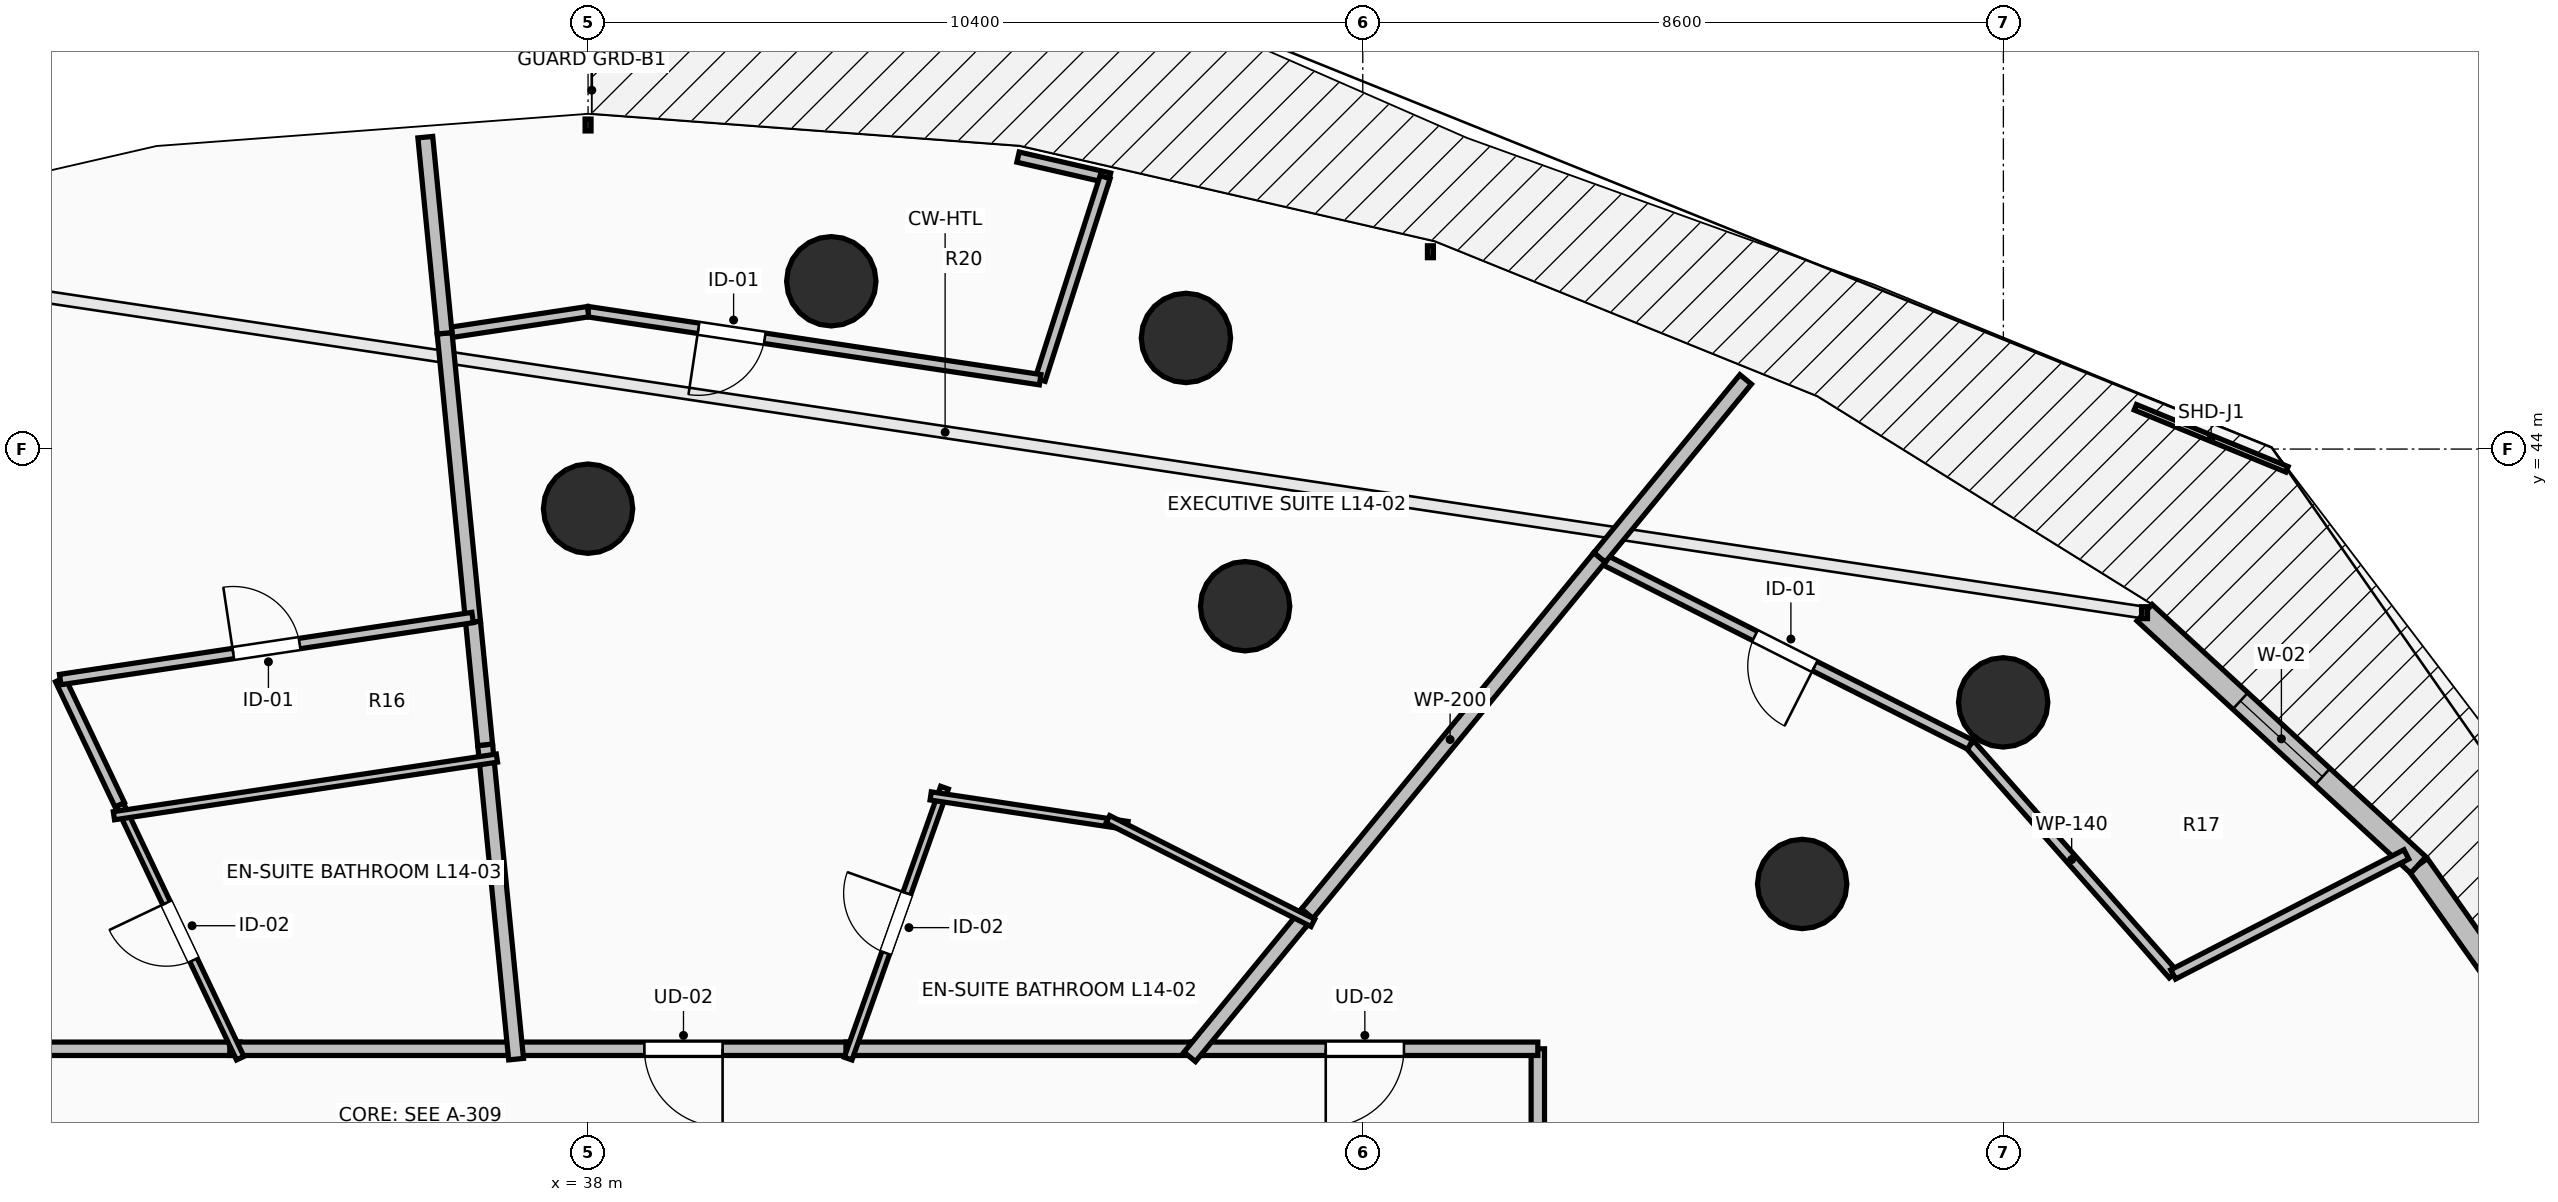
"""IFC4 building model, lengths in metres.
Left out: names, types, materials, properties, quantities, classifications, styles, units other than length and angle.
Written with IfcOpenShell. Run it as: python <this file> out.ifc"""

import sys

from ifc_helpers import new_model, si_unit, direction, frame, frame_2d, origin, origin_2d, place, context, subcontext, project, spatial, rectangle, circle, extrude, element, fill, save


model = new_model("IFC4")
c1 = context("Model", 3, precision=1e-05, world=origin(), true_north=direction((0.0, 1.0)))
c2 = subcontext(c1, "Body", "Model", "MODEL_VIEW")
j1 = project(units=[si_unit("LENGTHUNIT", "METRE"), si_unit("PLANEANGLEUNIT", "RADIAN")], contexts=[c1])
p1 = place(None, origin())
s1 = spatial("IfcSite", under=j1, at=p1, CompositionType="ELEMENT")
p2 = place(p1, origin())
s2 = spatial("IfcBuilding", under=s1, at=p2, CompositionType="ELEMENT")
p3 = place(p2, frame((0.0, 0.0, 55.5)))
s3 = spatial("IfcBuildingStorey", under=s2, at=p3, CompositionType="ELEMENT", Elevation=55.5)
for number, where, z_axis, x_axis in (
    (1, (54.299, 38.162, 0.0), (0.0, 0.0, 1.0), (0.707, 0.707, 0.0)),
    (2, (46.821, 41.891, 0.0), (0.0, 0.0, 1.0), (0.383, 0.924, 0.0)),
    (3, (38.0, 43.2, 0.0), (0.0, 0.0, 1.0), (0.0, 1.0, 0.0)),
    (4, (56.997, 40.6, 0.0), (0.0, 0.0, 1.0), (0.707, 0.707, 0.0)),
    (5, (46.026, 45.492, 0.0), (0.0, 0.0, 1.0), (0.383, 0.924, 0.0)),
    (6, (41.265, 46.252, 0.0), (0.0, 0.0, 1.0), (0.0, 1.0, 0.0)),
):
    element("IfcColumn", number, at=place(p3, frame(where, z_axis=z_axis, x_axis=x_axis)), inside=s3, PredefinedType="COLUMN", context=c2, shape_type="SweptSolid", body=[
        extrude(circle(Radius=0.6, at=origin_2d()), origin(), (0.0, 0.0, 1.0), 3.5),
    ])
p4 = place(p3, frame((65.301, 34.553, 0.0), z_axis=(0.0, 0.0, 1.0), x_axis=(-0.577130815624, 0.816651713803, 0.0)))
e7 = element("IfcWall", 7, at=p4, inside=s3, PredefinedType="STANDARD", context=c2, shape_type="SweptSolid", body=[
    extrude(rectangle(XDim=4.731, YDim=0.3, at=frame_2d((2.366, 0.0))), origin(), (0.0, 0.0, 1.0), 3.24),
])
p5 = place(p4, frame((1.566, 0.0, 0.0)))
e8 = element("IfcOpeningElement", 8, at=p5, cuts=e7, PredefinedType="OPENING", context=c2, shape_type="SweptSolid", body=[
    extrude(rectangle(XDim=1.6, YDim=2.3, at=frame_2d((0.8, 1.15))), frame((0.0, 0.165, 0.0), z_axis=(0.0, -1.0, 0.0), x_axis=(1.0, 0.0, 0.0)), (0.0, 0.0, 1.0), 0.33),
])
p6 = place(p3, frame((62.57, 38.417, 0.0), z_axis=(0.0, 0.0, 1.0), x_axis=(-0.735342629635, 0.677695519419, 0.0)))
e9 = element("IfcWall", 9, at=p6, inside=s3, PredefinedType="STANDARD", context=c2, shape_type="SweptSolid", body=[
    extrude(rectangle(XDim=4.997, YDim=0.3, at=frame_2d((2.499, 0.0))), origin(), (0.0, 0.0, 1.0), 3.24),
])
p7 = place(p6, frame((1.749, 0.0, 0.85)))
e10 = element("IfcOpeningElement", 10, at=p7, cuts=e9, PredefinedType="OPENING", context=c2, shape_type="SweptSolid", body=[
    extrude(rectangle(XDim=1.5, YDim=2.19, at=frame_2d((0.75, 1.095))), frame((0.0, 0.165, 0.0), z_axis=(0.0, -1.0, 0.0), x_axis=(1.0, 0.0, 0.0)), (0.0, 0.0, 1.0), 0.33),
])
p8 = place(p3, frame((50.75, 32.001, 0.0), z_axis=(0.0, 0.0, 1.0), x_axis=(0.0, 1.0, 0.0)))
e11 = element("IfcWall", 11, at=p8, inside=s3, PredefinedType="PARTITIONING", context=c2, shape_type="SweptSolid", body=[
    extrude(rectangle(XDim=3.949, YDim=0.18, at=frame_2d((1.975, 0.0))), origin(), (0.0, 0.0, 1.0), 2.432),
])
p9 = place(p3, frame((50.75, 35.95, 0.0), z_axis=(0.0, 0.0, 1.0), x_axis=(-1.0, 0.0, 0.0)))
e12 = element("IfcWall", 12, at=p9, inside=s3, PredefinedType="PARTITIONING", context=c2, shape_type="SweptSolid", body=[
    extrude(rectangle(XDim=4.644, YDim=0.18, at=frame_2d((2.322, 0.0))), origin(), (0.0, 0.0, 1.0), 2.432),
])
p10 = place(p9, frame((1.797, 0.0, 0.0)))
e13 = element("IfcOpeningElement", 13, at=p10, cuts=e12, PredefinedType="OPENING", context=c2, shape_type="SweptSolid", body=[
    extrude(rectangle(XDim=1.05, YDim=2.2, at=frame_2d((0.525, 1.1))), frame((0.0, 0.105, 0.0), z_axis=(0.0, -1.0, 0.0), x_axis=(1.0, 0.0, 0.0)), (0.0, 0.0, 1.0), 0.21),
])
p11 = place(p3, frame((41.602, 35.95, 0.0), z_axis=(0.0, 0.0, 1.0), x_axis=(-1.0, 0.0, 0.0)))
e14 = element("IfcWall", 14, at=p11, inside=s3, PredefinedType="PARTITIONING", context=c2, shape_type="SweptSolid", body=[
    extrude(rectangle(XDim=4.642, YDim=0.18, at=frame_2d((2.321, 0.0))), origin(), (0.0, 0.0, 1.0), 3.24),
])
p12 = place(p11, frame((1.796, 0.0, 0.0)))
e15 = element("IfcOpeningElement", 15, at=p12, cuts=e14, PredefinedType="OPENING", context=c2, shape_type="SweptSolid", body=[
    extrude(rectangle(XDim=1.05, YDim=2.2, at=frame_2d((0.525, 1.1))), frame((0.0, 0.105, 0.0), z_axis=(0.0, -1.0, 0.0), x_axis=(1.0, 0.0, 0.0)), (0.0, 0.0, 1.0), 0.21),
])
p13 = place(p3, frame((46.246, 35.95, 0.0), z_axis=(0.0, 0.0, 1.0), x_axis=(-1.0, 0.0, 0.0)))
e16 = element("IfcWall", 16, at=p13, inside=s3, PredefinedType="PARTITIONING", context=c2, shape_type="SweptSolid", body=[
    extrude(rectangle(XDim=4.784, YDim=0.18, at=frame_2d((2.392, 0.0))), origin(), (0.0, 0.0, 1.0), 3.24),
])
p14 = place(p3, frame((33.33, 35.95, 0.0), z_axis=(0.0, 0.0, 1.0), x_axis=(-1.0, 0.0, 0.0)))
e17 = element("IfcWall", 17, at=p14, inside=s3, PredefinedType="PARTITIONING", context=c2, shape_type="SweptSolid", body=[
    extrude(rectangle(XDim=7.549, YDim=0.18, at=frame_2d((3.774, 0.0))), origin(), (0.0, 0.0, 1.0), 2.432),
])
p15 = place(p14, frame((3.25, 0.0, 0.0)))
e18 = element("IfcOpeningElement", 18, at=p15, cuts=e17, PredefinedType="OPENING", context=c2, shape_type="SweptSolid", body=[
    extrude(rectangle(XDim=1.05, YDim=2.2, at=frame_2d((0.525, 1.1))), frame((0.0, 0.105, 0.0), z_axis=(0.0, -1.0, 0.0), x_axis=(1.0, 0.0, 0.0)), (0.0, 0.0, 1.0), 0.21),
])
p16 = place(p3, frame((37.1, 35.95, 0.0), z_axis=(0.0, 0.0, 1.0), x_axis=(-1.0, 0.0, 0.0)))
e19 = element("IfcWall", 19, at=p16, inside=s3, PredefinedType="PARTITIONING", context=c2, shape_type="SweptSolid", body=[
    extrude(rectangle(XDim=3.91, YDim=0.18, at=frame_2d((1.955, 0.0))), origin(), (0.0, 0.0, 1.0), 3.24),
])
p17 = place(p3, frame((59.279, 36.948, 0.0), z_axis=(0.0, 0.0, 1.0), x_axis=(-0.662159063844, 0.749363312532, 0.0)))
e20 = element("IfcWall", 20, at=p17, inside=s3, PredefinedType="PARTITIONING", context=c2, shape_type="SweptSolid", body=[
    extrude(rectangle(XDim=4.115, YDim=0.14, at=frame_2d((2.058, 0.0))), origin(), (0.0, 0.0, 1.0), 2.432),
])
p18 = place(p3, frame((56.554, 40.032, 0.0), z_axis=(0.0, 0.0, 1.0), x_axis=(-0.892518178955, 0.451011419184, 0.0)))
e21 = element("IfcWall", 21, at=p18, inside=s3, PredefinedType="PARTITIONING", context=c2, shape_type="SweptSolid", body=[
    extrude(rectangle(XDim=5.574, YDim=0.14, at=frame_2d((2.787, 0.0))), origin(), (0.0, 0.0, 1.0), 2.432),
])
p19 = place(p18, frame((2.337, 0.0, 0.0)))
e22 = element("IfcOpeningElement", 22, at=p19, cuts=e21, PredefinedType="OPENING", context=c2, shape_type="SweptSolid", body=[
    extrude(rectangle(XDim=0.9, YDim=2.1, at=frame_2d((0.45, 1.05))), frame((0.0, 0.085, 0.0), z_axis=(0.0, -1.0, 0.0), x_axis=(1.0, 0.0, 0.0)), (0.0, 0.0, 1.0), 0.17),
])
p20 = place(p3, frame((62.41, 38.559, 0.0), z_axis=(0.0, 0.0, 1.0), x_axis=(-0.889180616302, -0.457556369852, 0.0)))
e23 = element("IfcWall", 23, at=p20, inside=s3, PredefinedType="PARTITIONING", context=c2, shape_type="SweptSolid", body=[
    extrude(rectangle(XDim=3.521, YDim=0.14, at=frame_2d((1.76, 0.0))), origin(), (0.0, 0.0, 1.0), 2.624),
])
p21 = place(p3, frame((51.579, 42.546, 0.0), z_axis=(0.0, 0.0, 1.0), x_axis=(-0.634407686013, -0.772998633846, 0.0)))
e24 = element("IfcWall", 24, at=p21, inside=s3, PredefinedType="PARTITIONING", context=c2, shape_type="SweptSolid", body=[
    extrude(rectangle(XDim=6.326, YDim=0.2, at=frame_2d((3.163, 0.0))), origin(), (0.0, 0.0, 1.0), 2.432),
])
p22 = place(p3, frame((47.655, 37.764, 0.0), z_axis=(0.0, 0.0, 1.0), x_axis=(-0.634343688691, -0.773051152653, 0.0)))
e25 = element("IfcWall", 25, at=p22, inside=s3, PredefinedType="PARTITIONING", context=c2, shape_type="SweptSolid", body=[
    extrude(rectangle(XDim=2.487, YDim=0.2, at=frame_2d((1.244, 0.0))), origin(), (0.0, 0.0, 1.0), 2.432),
])
p23 = place(p3, frame((53.54, 44.935, 0.0), z_axis=(0.0, 0.0, 1.0), x_axis=(-0.634432805544, -0.772978017313, 0.0)))
e26 = element("IfcWall", 26, at=p23, inside=s3, PredefinedType="PARTITIONING", context=c2, shape_type="SweptSolid", body=[
    extrude(rectangle(XDim=3.091, YDim=0.2, at=frame_2d((1.545, 0.0))), origin(), (0.0, 0.0, 1.0), 2.624),
])
p24 = place(p3, frame((41.491, 35.818, 0.0), z_axis=(0.0, 0.0, 1.0), x_axis=(0.33515815105, 0.942161883004, 0.0)))
e27 = element("IfcWall", 27, at=p24, inside=s3, PredefinedType="PARTITIONING", context=c2, shape_type="SweptSolid", body=[
    extrude(rectangle(XDim=3.86, YDim=0.11, at=frame_2d((1.93, 0.0))), origin(), (0.0, 0.0, 1.0), 2.929),
])
p25 = place(p24, frame((1.505, 0.0, 0.0)))
e28 = element("IfcOpeningElement", 28, at=p25, cuts=e27, PredefinedType="OPENING", context=c2, shape_type="SweptSolid", body=[
    extrude(rectangle(XDim=0.85, YDim=2.1, at=frame_2d((0.425, 1.05))), frame((0.0, 0.07, 0.0), z_axis=(0.0, -1.0, 0.0), x_axis=(1.0, 0.0, 0.0)), (0.0, 0.0, 1.0), 0.14),
])
p26 = place(p3, frame((42.6, 39.344, 0.0), z_axis=(0.0, 0.0, 1.0), x_axis=(0.988924954203, -0.148416424141, 0.0)))
e29 = element("IfcWall", 29, at=p26, inside=s3, PredefinedType="PARTITIONING", context=c2, shape_type="SweptSolid", body=[
    extrude(rectangle(XDim=2.671, YDim=0.11, at=frame_2d((1.336, 0.0))), origin(), (0.0, 0.0, 1.0), 3.24),
])
p27 = place(p3, frame((44.978, 39.031, 0.0), z_axis=(0.0, 0.0, 1.0), x_axis=(0.892423163915, -0.451199397725, 0.0)))
e30 = element("IfcWall", 30, at=p27, inside=s3, PredefinedType="PARTITIONING", context=c2, shape_type="SweptSolid", body=[
    extrude(rectangle(XDim=3.084, YDim=0.11, at=frame_2d((1.542, 0.0))), origin(), (0.0, 0.0, 1.0), 2.432),
])
p28 = place(p3, frame((45.0, 47.637, 0.0), z_axis=(0.0, 0.0, 1.0), x_axis=(-0.974635544723, 0.223798022695, 0.0)))
e31 = element("IfcWall", 31, at=p28, inside=s3, PredefinedType="PARTITIONING", context=c2, shape_type="SweptSolid", body=[
    extrude(rectangle(XDim=1.26, YDim=0.14, at=frame_2d((0.63, 0.0))), origin(), (0.0, 0.0, 1.0), 3.24),
])
p29 = place(p3, frame((44.941, 47.65, 0.0), z_axis=(0.0, 0.0, 1.0), x_axis=(-0.305331010086, -0.952246278165, 0.0)))
e32 = element("IfcWall", 32, at=p29, inside=s3, PredefinedType="PARTITIONING", context=c2, shape_type="SweptSolid", body=[
    extrude(rectangle(XDim=2.855, YDim=0.14, at=frame_2d((1.428, 0.0))), origin(), (0.0, 0.0, 1.0), 2.624),
])
p30 = place(p3, frame((44.069, 44.931, 0.0), z_axis=(0.0, 0.0, 1.0), x_axis=(-0.988871191019, 0.148774216759, 0.0)))
e33 = element("IfcWall", 33, at=p30, inside=s3, PredefinedType="PARTITIONING", context=c2, shape_type="SweptSolid", body=[
    extrude(rectangle(XDim=6.137, YDim=0.14, at=frame_2d((3.069, 0.0))), origin(), (0.0, 0.0, 1.0), 2.432),
])
p31 = place(p30, frame((3.739, 0.0, 0.0)))
e34 = element("IfcOpeningElement", 34, at=p31, cuts=e33, PredefinedType="OPENING", context=c2, shape_type="SweptSolid", body=[
    extrude(rectangle(XDim=0.9, YDim=2.1, at=frame_2d((0.45, 1.05))), frame((0.0, 0.085, 0.0), z_axis=(0.0, -1.0, 0.0), x_axis=(1.0, 0.0, 0.0)), (0.0, 0.0, 1.0), 0.17),
])
p32 = place(p3, frame((38.0, 45.844, 0.0), z_axis=(0.0, 0.0, 1.0), x_axis=(-0.988850683948, -0.148910459188, 0.0)))
e35 = element("IfcWall", 35, at=p32, inside=s3, PredefinedType="PARTITIONING", context=c2, shape_type="SweptSolid", body=[
    extrude(rectangle(XDim=1.948, YDim=0.14, at=frame_2d((0.974, 0.0))), origin(), (0.0, 0.0, 1.0), 2.624),
])
p33 = place(p3, frame((36.074, 45.554, 0.0), z_axis=(0.0, 0.0, 1.0), x_axis=(0.098125465648, -0.995174051607, 0.0)))
e36 = element("IfcWall", 36, at=p33, inside=s3, PredefinedType="PARTITIONING", context=c2, shape_type="SweptSolid", body=[
    extrude(rectangle(XDim=3.894, YDim=0.2, at=frame_2d((1.947, 0.0))), origin(), (0.0, 0.0, 1.0), 2.432),
])
p34 = place(p3, frame((36.618, 40.03, 0.0), z_axis=(0.0, 0.0, 1.0), x_axis=(0.09794716995, -0.995191615669, 0.0)))
e37 = element("IfcWall", 37, at=p34, inside=s3, PredefinedType="PARTITIONING", context=c2, shape_type="SweptSolid", body=[
    extrude(rectangle(XDim=4.24, YDim=0.2, at=frame_2d((2.12, 0.0))), origin(), (0.0, 0.0, 1.0), 2.929),
])
p35 = place(p3, frame((36.456, 41.679, 0.0), z_axis=(0.0, 0.0, 1.0), x_axis=(0.098146679276, -0.995171959687, 0.0)))
e38 = element("IfcWall", 38, at=p35, inside=s3, PredefinedType="PARTITIONING", context=c2, shape_type="SweptSolid", body=[
    extrude(rectangle(XDim=1.657, YDim=0.2, at=frame_2d((0.828, 0.0))), origin(), (0.0, 0.0, 1.0), 2.432),
])
p36 = place(p3, frame((35.815, 48.187, 0.0), z_axis=(0.0, 0.0, 1.0), x_axis=(0.097904750383, -0.995195789708, 0.0)))
e39 = element("IfcWall", 39, at=p36, inside=s3, PredefinedType="PARTITIONING", context=c2, shape_type="SweptSolid", body=[
    extrude(rectangle(XDim=2.646, YDim=0.2, at=frame_2d((1.323, 0.0))), origin(), (0.0, 0.0, 1.0), 2.624),
])
p37 = place(p3, frame((33.33, 35.823, 0.0), z_axis=(0.0, 0.0, 1.0), x_axis=(-0.429339722165, 0.903143068938, 0.0)))
e40 = element("IfcWall", 40, at=p37, inside=s3, PredefinedType="PARTITIONING", context=c2, shape_type="SweptSolid", body=[
    extrude(rectangle(XDim=3.767, YDim=0.11, at=frame_2d((1.883, 0.0))), origin(), (0.0, 0.0, 1.0), 2.432),
])
p38 = place(p37, frame((1.458, 0.0, 0.0)))
e41 = element("IfcOpeningElement", 41, at=p38, cuts=e40, PredefinedType="OPENING", context=c2, shape_type="SweptSolid", body=[
    extrude(rectangle(XDim=0.85, YDim=2.1, at=frame_2d((0.425, 1.05))), frame((0.0, 0.07, 0.0), z_axis=(0.0, -1.0, 0.0), x_axis=(1.0, 0.0, 0.0)), (0.0, 0.0, 1.0), 0.14),
])
p39 = place(p3, frame((31.713, 39.225, 0.0), z_axis=(0.0, 0.0, 1.0), x_axis=(-0.429281598359, 0.90317069777, 0.0)))
e42 = element("IfcWall", 42, at=p39, inside=s3, PredefinedType="PARTITIONING", context=c2, shape_type="SweptSolid", body=[
    extrude(rectangle(XDim=1.861, YDim=0.14, at=frame_2d((0.93, 0.0))), origin(), (0.0, 0.0, 1.0), 2.886),
])
p40 = place(p3, frame((30.914, 40.906, 0.0), z_axis=(0.0, 0.0, 1.0), x_axis=(0.988867472121, 0.148798933401, 0.0)))
e43 = element("IfcWall", 43, at=p40, inside=s3, PredefinedType="PARTITIONING", context=c2, shape_type="SweptSolid", body=[
    extrude(rectangle(XDim=5.598, YDim=0.14, at=frame_2d((2.799, 0.0))), origin(), (0.0, 0.0, 1.0), 2.432),
])
p41 = place(p40, frame((2.349, 0.0, 0.0)))
e44 = element("IfcOpeningElement", 44, at=p41, cuts=e43, PredefinedType="OPENING", context=c2, shape_type="SweptSolid", body=[
    extrude(rectangle(XDim=0.9, YDim=2.1, at=frame_2d((0.45, 1.05))), frame((0.0, 0.085, 0.0), z_axis=(0.0, -1.0, 0.0), x_axis=(1.0, 0.0, 0.0)), (0.0, 0.0, 1.0), 0.17),
])
p42 = place(p3, frame((36.776, 39.852, 0.0), z_axis=(0.0, 0.0, 1.0), x_axis=(-0.988868403521, -0.148792743496, 0.0)))
e45 = element("IfcWall", 45, at=p42, inside=s3, PredefinedType="PARTITIONING", context=c2, shape_type="SweptSolid", body=[
    extrude(rectangle(XDim=5.2, YDim=0.11, at=frame_2d((2.6, 0.0))), origin(), (0.0, 0.0, 1.0), 2.432),
])
p43 = place(p7, origin())
e46 = element("IfcWindow", 46, at=p43, inside=s3, PartitioningType="SINGLE_PANEL", PredefinedType="WINDOW", context=c2, shape_type="SweptSolid", body=[
    extrude(rectangle(XDim=1.5, YDim=2.19, at=frame_2d((0.75, 1.095))), frame((0.0, 0.03, 0.0), z_axis=(0.0, -1.0, 0.0), x_axis=(1.0, 0.0, 0.0)), (0.0, 0.0, 1.0), 0.06),
])
fill(e10, e46)
p44 = place(p10, origin())
e47 = element("IfcDoor", 47, at=p44, inside=s3, OperationType="SINGLE_SWING_RIGHT", PredefinedType="DOOR", context=c2, shape_type="SweptSolid", body=[
    extrude(rectangle(XDim=1.05, YDim=2.2, at=frame_2d((0.525, 1.1))), frame((0.0, 0.025, 0.0), z_axis=(0.0, -1.0, 0.0), x_axis=(1.0, 0.0, 0.0)), (0.0, 0.0, 1.0), 0.05),
])
fill(e13, e47)
p45 = place(p12, origin())
e48 = element("IfcDoor", 48, at=p45, inside=s3, OperationType="SINGLE_SWING_LEFT", PredefinedType="DOOR", context=c2, shape_type="SweptSolid", body=[
    extrude(rectangle(XDim=1.05, YDim=2.2, at=frame_2d((0.525, 1.1))), frame((0.0, 0.025, 0.0), z_axis=(0.0, -1.0, 0.0), x_axis=(1.0, 0.0, 0.0)), (0.0, 0.0, 1.0), 0.05),
])
fill(e15, e48)
p46 = place(p19, origin())
e49 = element("IfcDoor", 49, at=p46, inside=s3, OperationType="SINGLE_SWING_LEFT", PredefinedType="DOOR", context=c2, shape_type="SweptSolid", body=[
    extrude(rectangle(XDim=0.9, YDim=2.1, at=frame_2d((0.45, 1.05))), frame((0.0, 0.025, 0.0), z_axis=(0.0, -1.0, 0.0), x_axis=(1.0, 0.0, 0.0)), (0.0, 0.0, 1.0), 0.05),
])
fill(e22, e49)
p47 = place(p25, origin())
e50 = element("IfcDoor", 50, at=p47, inside=s3, OperationType="SINGLE_SWING_RIGHT", PredefinedType="DOOR", context=c2, shape_type="SweptSolid", body=[
    extrude(rectangle(XDim=0.85, YDim=2.1, at=frame_2d((0.425, 1.05))), frame((0.0, 0.025, 0.0), z_axis=(0.0, -1.0, 0.0), x_axis=(1.0, 0.0, 0.0)), (0.0, 0.0, 1.0), 0.05),
])
fill(e28, e50)
p48 = place(p31, origin())
e51 = element("IfcDoor", 51, at=p48, inside=s3, OperationType="SINGLE_SWING_RIGHT", PredefinedType="DOOR", context=c2, shape_type="SweptSolid", body=[
    extrude(rectangle(XDim=0.9, YDim=2.1, at=frame_2d((0.45, 1.05))), frame((0.0, 0.025, 0.0), z_axis=(0.0, -1.0, 0.0), x_axis=(1.0, 0.0, 0.0)), (0.0, 0.0, 1.0), 0.05),
])
fill(e34, e51)
p49 = place(p38, origin())
e52 = element("IfcDoor", 52, at=p49, inside=s3, OperationType="SINGLE_SWING_RIGHT", PredefinedType="DOOR", context=c2, shape_type="SweptSolid", body=[
    extrude(rectangle(XDim=0.85, YDim=2.1, at=frame_2d((0.425, 1.05))), frame((0.0, 0.025, 0.0), z_axis=(0.0, -1.0, 0.0), x_axis=(1.0, 0.0, 0.0)), (0.0, 0.0, 1.0), 0.05),
])
fill(e41, e52)
p50 = place(p41, origin())
e53 = element("IfcDoor", 53, at=p50, inside=s3, OperationType="SINGLE_SWING_LEFT", PredefinedType="DOOR", context=c2, shape_type="SweptSolid", body=[
    extrude(rectangle(XDim=0.9, YDim=2.1, at=frame_2d((0.45, 1.05))), frame((0.0, 0.025, 0.0), z_axis=(0.0, -1.0, 0.0), x_axis=(1.0, 0.0, 0.0)), (0.0, 0.0, 1.0), 0.05),
])
fill(e44, e53)
save(model, sys.argv[1])
